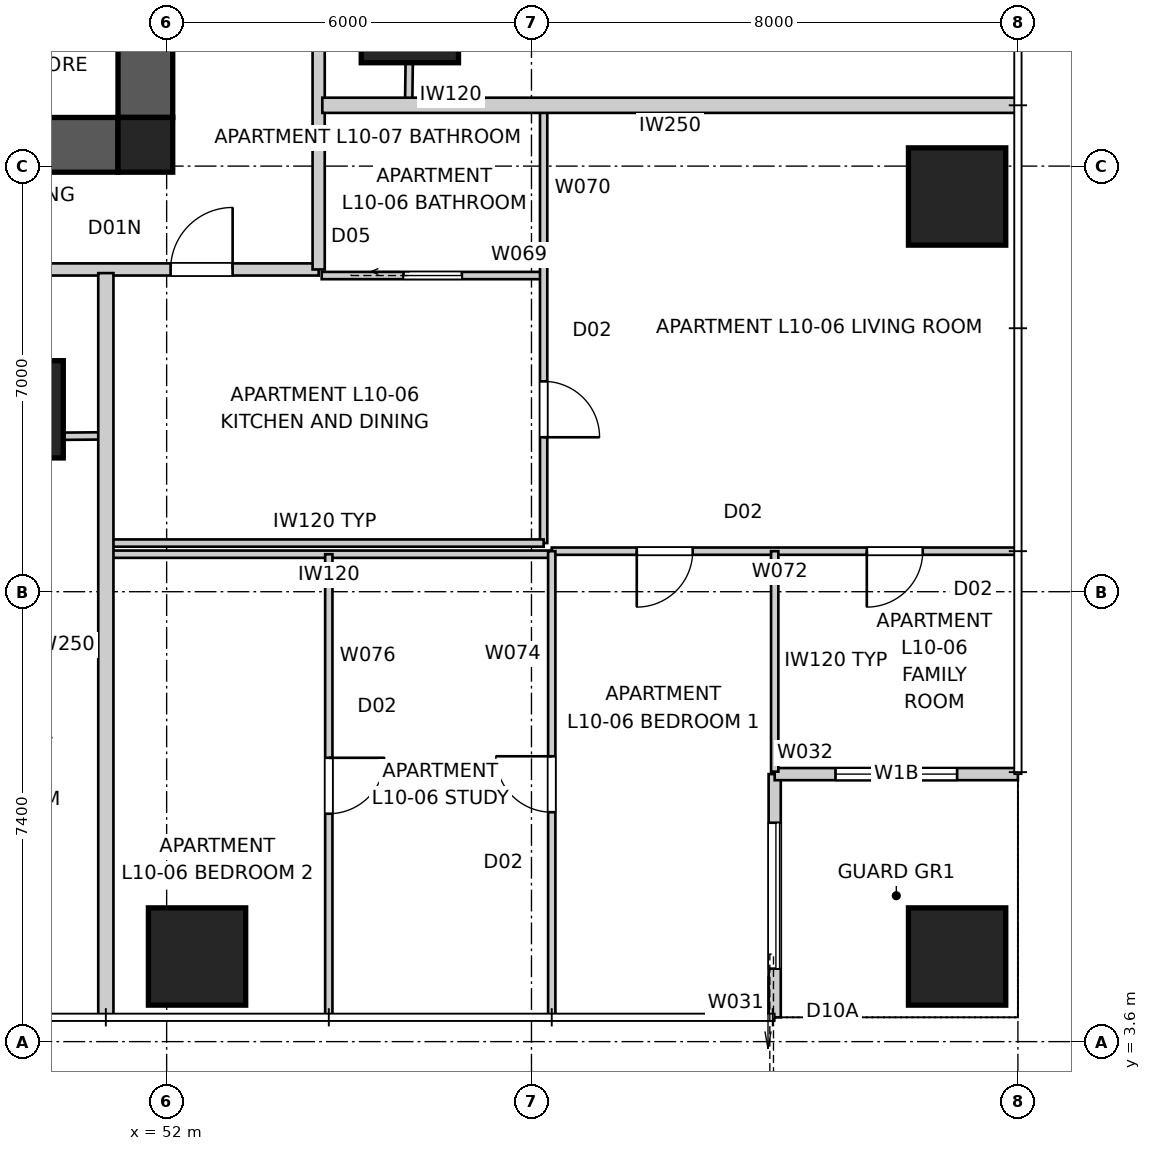
"""IFC4 building model, lengths in metres.
Left out: names, types, materials, properties, quantities, classifications, styles, units other than length and angle.
Written with IfcOpenShell. Run it as: python <this file> out.ifc"""

import sys

from ifc_helpers import new_model, si_unit, direction, frame, frame_2d, origin, origin_2d, place, context, subcontext, project, spatial, polyline, rectangle, outline, extrude, element, fill, save


model = new_model("IFC4")
c1 = context("Model", 3, precision=1e-05, world=origin(), true_north=direction((0.0, 1.0)))
c2 = subcontext(c1, "Body", "Model", "MODEL_VIEW")
j1 = project(units=[si_unit("LENGTHUNIT", "METRE"), si_unit("PLANEANGLEUNIT", "RADIAN")], contexts=[c1])
p1 = place(None, origin())
s1 = spatial("IfcSite", under=j1, at=p1, CompositionType="ELEMENT")
p2 = place(p1, origin())
s2 = spatial("IfcBuilding", under=s1, at=p2, CompositionType="ELEMENT")
p3 = place(p2, frame((0.0, 0.0, 38.8)))
s3 = spatial("IfcBuildingStorey", under=s2, at=p3, CompositionType="ELEMENT", Elevation=38.8)
p4 = place(p3, frame((51.2, 18.35, 0.0), z_axis=(0.0, 0.0, 1.0), x_axis=(-1.0, 0.0, 0.0)))
e1 = element("IfcWall", 1, at=p4, inside=s3, PredefinedType="SHEAR", context=c2, shape_type="SweptSolid", body=[
    extrude(outline(polyline([(0.0, -0.45), (22.4, -0.45), (22.4, -0.025), (22.85, -0.025), (22.85, 0.025), (22.4, 0.025), (22.4, 0.45), (0.0, 0.45), (0.0, 0.025), (-0.45, 0.025), (-0.45, -0.025), (0.0, -0.025), (0.0, -0.45)])), origin(), (0.0, 0.0, 1.0), 3.4),
])
p5 = place(p3, frame((51.65, 18.8, 0.0), z_axis=(0.0, 0.0, 1.0), x_axis=(0.0, 1.0, 0.0)))
e2 = element("IfcWall", 2, at=p5, inside=s3, PredefinedType="SHEAR", context=c2, shape_type="SweptSolid", body=[
    extrude(outline(polyline([(0.0, -0.45), (22.4, -0.45), (22.4, -0.025), (22.85, -0.025), (22.85, 0.025), (22.4, 0.025), (22.4, 0.45), (0.0, 0.45), (0.0, 0.025), (-0.45, 0.025), (-0.45, -0.025), (0.0, -0.025), (0.0, -0.45)])), origin(), (0.0, 0.0, 1.0), 3.4),
])
p6 = place(p5, frame((11.14, 0.0, 0.0)))
e3 = element("IfcOpeningElement", 3, at=p6, cuts=e2, PredefinedType="OPENING", context=c2, shape_type="SweptSolid", body=[
    extrude(rectangle(XDim=1.02, YDim=2.4, at=frame_2d((0.51, 1.2))), frame((0.0, 0.46, 0.0), z_axis=(0.0, -1.0, 0.0), x_axis=(1.0, 0.0, 0.0)), (0.0, 0.0, 1.0), 0.92),
])
p7 = place(p3, frame((51.65, 18.35, 0.0), z_axis=(0.0, 0.0, 1.0), x_axis=(1.0, 0.0, 0.0)))
e4 = element("IfcColumn", 4, at=p7, inside=s3, PredefinedType="COLUMN", context=c2, shape_type="SweptSolid", body=[
    extrude(rectangle(XDim=0.9, YDim=0.9, at=origin_2d()), origin(), (0.0, 0.0, 1.0), 3.4),
])
for number, where, z_axis, x_axis in (
    (5, (52.5, 5.0, 0.0), (0.0, 0.0, 1.0), (1.0, 0.0, 0.0)),
    (6, (65.0, 5.0, 0.0), (0.0, 0.0, 1.0), (1.0, 0.0, 0.0)),
    (7, (65.0, 17.5, 0.0), (0.0, 0.0, 1.0), (1.0, 0.0, 0.0)),
):
    element("IfcColumn", number, at=place(p3, frame(where, z_axis=z_axis, x_axis=x_axis)), inside=s3, PredefinedType="COLUMN", context=c2, shape_type="SweptSolid", body=[
        extrude(rectangle(XDim=1.6, YDim=1.6, at=origin_2d()), origin(), (0.0, 0.0, 1.0), 3.2),
    ])
for number, where, z_axis, x_axis in (
    (8, (49.5, 14.0, 0.0), (0.0, 0.0, 1.0), (1.0, 0.0, 0.0)),
    (9, (56.0, 20.5, 0.0), (0.0, 0.0, 1.0), (1.0, 0.0, 0.0)),
):
    element("IfcColumn", number, at=place(p3, frame(where, z_axis=z_axis, x_axis=x_axis)), inside=s3, PredefinedType="COLUMN", context=c2, shape_type="SweptSolid", body=[
        extrude(rectangle(XDim=1.6, YDim=1.6, at=origin_2d()), origin(), (0.0, 0.0, 1.0), 3.4),
    ])
p8 = place(p3, frame((62.0, 4.0, 0.0), z_axis=(0.0, 0.0, 1.0), x_axis=(0.0, 1.0, 0.0)))
e10 = element("IfcWall", 10, at=p8, inside=s3, PredefinedType="SOLIDWALL", context=c2, shape_type="SweptSolid", body=[
    extrude(rectangle(XDim=4.0, YDim=0.2, at=frame_2d((2.0, 0.0))), origin(), (0.0, 0.0, 1.0), 3.2),
])
p9 = place(p8, frame((0.8, 0.0, 0.0)))
e11 = element("IfcOpeningElement", 11, at=p9, cuts=e10, PredefinedType="OPENING", context=c2, shape_type="SweptSolid", body=[
    extrude(rectangle(XDim=2.4, YDim=2.1, at=frame_2d((1.2, 1.05))), frame((0.0, 0.11, 0.0), z_axis=(0.0, -1.0, 0.0), x_axis=(1.0, 0.0, 0.0)), (0.0, 0.0, 1.0), 0.22),
])
p10 = place(p3, frame((62.0, 8.0, 0.0), z_axis=(0.0, 0.0, 1.0), x_axis=(1.0, 0.0, 0.0)))
e12 = element("IfcWall", 12, at=p10, inside=s3, PredefinedType="SOLIDWALL", context=c2, shape_type="SweptSolid", body=[
    extrude(rectangle(XDim=4.0, YDim=0.2, at=frame_2d((2.0, 0.0))), origin(), (0.0, 0.0, 1.0), 3.2),
])
p11 = place(p10, frame((1.0, 0.0, 0.4)))
e13 = element("IfcOpeningElement", 13, at=p11, cuts=e12, PredefinedType="OPENING", context=c2, shape_type="SweptSolid", body=[
    extrude(rectangle(XDim=2.0, YDim=1.8, at=frame_2d((1.0, 0.9))), frame((0.0, 0.11, 0.0), z_axis=(0.0, -1.0, 0.0), x_axis=(1.0, 0.0, 0.0)), (0.0, 0.0, 1.0), 0.22),
])
p12 = place(p3, frame((26.3, 16.3, 0.0), z_axis=(0.0, 0.0, 1.0), x_axis=(1.0, 0.0, 0.0)))
e14 = element("IfcWall", 14, at=p12, inside=s3, PredefinedType="PARTITIONING", context=c2, shape_type="SweptSolid", body=[
    extrude(rectangle(XDim=28.2, YDim=0.2, at=frame_2d((14.1, 0.0))), origin(), (0.0, 0.0, 1.0), 3.2),
])
p13 = place(p12, frame((4.738, 0.0, 0.0)))
e15 = element("IfcOpeningElement", 15, at=p13, cuts=e14, PredefinedType="OPENING", context=c2, shape_type="SweptSolid", body=[
    extrude(rectangle(XDim=1.02, YDim=2.34, at=frame_2d((0.51, 1.17))), frame((0.0, 0.11, 0.0), z_axis=(0.0, -1.0, 0.0), x_axis=(1.0, 0.0, 0.0)), (0.0, 0.0, 1.0), 0.22),
])
p14 = place(p12, frame((14.525, 0.0, 0.0)))
e16 = element("IfcOpeningElement", 16, at=p14, cuts=e14, PredefinedType="OPENING", context=c2, shape_type="SweptSolid", body=[
    extrude(rectangle(XDim=1.02, YDim=2.34, at=frame_2d((0.51, 1.17))), frame((0.0, 0.11, 0.0), z_axis=(0.0, -1.0, 0.0), x_axis=(1.0, 0.0, 0.0)), (0.0, 0.0, 1.0), 0.22),
])
p15 = place(p12, frame((22.333, 0.0, 0.0)))
e17 = element("IfcOpeningElement", 17, at=p15, cuts=e14, PredefinedType="OPENING", context=c2, shape_type="SweptSolid", body=[
    extrude(rectangle(XDim=1.02, YDim=2.34, at=frame_2d((0.51, 1.17))), frame((0.0, 0.11, 0.0), z_axis=(0.0, -1.0, 0.0), x_axis=(1.0, 0.0, 0.0)), (0.0, 0.0, 1.0), 0.22),
])
p16 = place(p12, frame((25.765, 0.0, 0.0)))
e18 = element("IfcOpeningElement", 18, at=p16, cuts=e14, PredefinedType="OPENING", context=c2, shape_type="SweptSolid", body=[
    extrude(rectangle(XDim=1.02, YDim=2.0, at=frame_2d((0.51, 1.0))), frame((0.0, 0.11, 0.0), z_axis=(0.0, -1.0, 0.0), x_axis=(1.0, 0.0, 0.0)), (0.0, 0.0, 1.0), 0.22),
])
p17 = place(p12, frame((1.015, 0.0, 0.0)))
e19 = element("IfcOpeningElement", 19, at=p17, cuts=e14, PredefinedType="OPENING", context=c2, shape_type="SweptSolid", body=[
    extrude(rectangle(XDim=1.02, YDim=2.0, at=frame_2d((0.51, 1.0))), frame((0.0, 0.11, 0.0), z_axis=(0.0, -1.0, 0.0), x_axis=(1.0, 0.0, 0.0)), (0.0, 0.0, 1.0), 0.22),
])
p18 = place(p3, frame((54.5, 16.3, 0.0), z_axis=(0.0, 0.0, 1.0), x_axis=(0.0, 1.0, 0.0)))
e20 = element("IfcWall", 20, at=p18, inside=s3, PredefinedType="PARTITIONING", context=c2, shape_type="SweptSolid", body=[
    extrude(rectangle(XDim=28.2, YDim=0.2, at=frame_2d((14.1, 0.0))), origin(), (0.0, 0.0, 1.0), 3.2),
])
p19 = place(p18, frame((7.277, 0.0, 0.0)))
e21 = element("IfcOpeningElement", 21, at=p19, cuts=e20, PredefinedType="OPENING", context=c2, shape_type="SweptSolid", body=[
    extrude(rectangle(XDim=1.02, YDim=2.34, at=frame_2d((0.51, 1.17))), frame((0.0, 0.11, 0.0), z_axis=(0.0, -1.0, 0.0), x_axis=(1.0, 0.0, 0.0)), (0.0, 0.0, 1.0), 0.22),
])
p20 = place(p18, frame((15.16, 0.0, 0.0)))
e22 = element("IfcOpeningElement", 22, at=p20, cuts=e20, PredefinedType="OPENING", context=c2, shape_type="SweptSolid", body=[
    extrude(rectangle(XDim=1.02, YDim=2.34, at=frame_2d((0.51, 1.17))), frame((0.0, 0.11, 0.0), z_axis=(0.0, -1.0, 0.0), x_axis=(1.0, 0.0, 0.0)), (0.0, 0.0, 1.0), 0.22),
])
p21 = place(p3, frame((51.0, 4.0, 0.0), z_axis=(0.0, 0.0, 1.0), x_axis=(0.0, 1.0, 0.0)))
e23 = element("IfcWall", 23, at=p21, inside=s3, PredefinedType="PARTITIONING", context=c2, shape_type="SweptSolid", body=[
    extrude(rectangle(XDim=12.24, YDim=0.25, at=frame_2d((6.12, 0.0))), origin(), (0.0, 0.0, 1.0), 3.2),
])
p22 = place(p3, frame((66.0, 19.0, 0.0), z_axis=(0.0, 0.0, 1.0), x_axis=(-1.0, 0.0, 0.0)))
e24 = element("IfcWall", 24, at=p22, inside=s3, PredefinedType="PARTITIONING", context=c2, shape_type="SweptSolid", body=[
    extrude(rectangle(XDim=11.44, YDim=0.25, at=frame_2d((5.72, 0.0))), origin(), (0.0, 0.0, 1.0), 3.2),
])
p23 = place(p3, frame((51.0, 13.563, 0.0), z_axis=(0.0, 0.0, 1.0), x_axis=(-0.9999611125, -0.008818927805, 0.0)))
e25 = element("IfcWall", 25, at=p23, inside=s3, PredefinedType="PARTITIONING", context=c2, shape_type="SweptSolid", body=[
    extrude(rectangle(XDim=3.71, YDim=0.12, at=frame_2d((1.855, 0.0))), origin(), (0.0, 0.0, 1.0), 2.2),
])
p24 = place(p23, frame((2.445, 0.0, 0.0)))
e26 = element("IfcOpeningElement", 26, at=p24, cuts=e25, PredefinedType="OPENING", context=c2, shape_type="SweptSolid", body=[
    extrude(rectangle(XDim=0.92, YDim=2.1, at=frame_2d((0.46, 1.05))), frame((0.0, 0.07, 0.0), z_axis=(0.0, -1.0, 0.0), x_axis=(1.0, 0.0, 0.0)), (0.0, 0.0, 1.0), 0.14),
])
p25 = place(p3, frame((54.55, 16.2, 0.0), z_axis=(0.0, 0.0, 1.0), x_axis=(1.0, 0.0, 0.0)))
e27 = element("IfcWall", 27, at=p25, inside=s3, PredefinedType="PARTITIONING", context=c2, shape_type="SweptSolid", body=[
    extrude(rectangle(XDim=3.65, YDim=0.12, at=frame_2d((1.825, 0.0))), origin(), (0.0, 0.0, 1.0), 3.2),
])
p26 = place(p25, frame((1.345, 0.0, 0.0)))
e28 = element("IfcOpeningElement", 28, at=p26, cuts=e27, PredefinedType="OPENING", context=c2, shape_type="SweptSolid", body=[
    extrude(rectangle(XDim=0.96, YDim=2.1, at=frame_2d((0.48, 1.05))), frame((0.0, 0.07, 0.0), z_axis=(0.0, -1.0, 0.0), x_axis=(1.0, 0.0, 0.0)), (0.0, 0.0, 1.0), 0.14),
])
p27 = place(p3, frame((58.2, 19.0, 0.0), z_axis=(0.0, 0.0, 1.0), x_axis=(0.0, -1.0, 0.0)))
e29 = element("IfcWall", 29, at=p27, inside=s3, PredefinedType="PARTITIONING", context=c2, shape_type="SweptSolid", body=[
    extrude(rectangle(XDim=7.2, YDim=0.12, at=frame_2d((3.6, 0.0))), origin(), (0.0, 0.0, 1.0), 3.2),
])
p28 = place(p27, frame((4.54, 0.0, 0.0)))
e30 = element("IfcOpeningElement", 30, at=p28, cuts=e29, PredefinedType="OPENING", context=c2, shape_type="SweptSolid", body=[
    extrude(rectangle(XDim=0.92, YDim=2.34, at=frame_2d((0.46, 1.17))), frame((0.0, 0.07, 0.0), z_axis=(0.0, -1.0, 0.0), x_axis=(1.0, 0.0, 0.0)), (0.0, 0.0, 1.0), 0.14),
])
p29 = place(p3, frame((58.2, 11.8, 0.0), z_axis=(0.0, 0.0, 1.0), x_axis=(-1.0, 0.0, 0.0)))
e31 = element("IfcWall", 31, at=p29, inside=s3, PredefinedType="PARTITIONING", context=c2, shape_type="SweptSolid", body=[
    extrude(rectangle(XDim=7.2, YDim=0.12, at=frame_2d((3.6, 0.0))), origin(), (0.0, 0.0, 1.0), 3.2),
])
p30 = place(p3, frame((65.96, 11.667, 0.0), z_axis=(0.0, 0.0, 1.0), x_axis=(-1.0, 0.0, 0.0)))
e32 = element("IfcWall", 32, at=p30, inside=s3, PredefinedType="PARTITIONING", context=c2, shape_type="SweptSolid", body=[
    extrude(rectangle(XDim=7.627, YDim=0.12, at=frame_2d((3.813, 0.0))), origin(), (0.0, 0.0, 1.0), 3.2),
])
p31 = place(p30, frame((1.525, 0.0, 0.0)))
e33 = element("IfcOpeningElement", 33, at=p31, cuts=e32, PredefinedType="OPENING", context=c2, shape_type="SweptSolid", body=[
    extrude(rectangle(XDim=0.92, YDim=2.34, at=frame_2d((0.46, 1.17))), frame((0.0, 0.07, 0.0), z_axis=(0.0, -1.0, 0.0), x_axis=(1.0, 0.0, 0.0)), (0.0, 0.0, 1.0), 0.14),
])
p32 = place(p30, frame((5.308, 0.0, 0.0)))
e34 = element("IfcOpeningElement", 34, at=p32, cuts=e32, PredefinedType="OPENING", context=c2, shape_type="SweptSolid", body=[
    extrude(rectangle(XDim=0.92, YDim=2.34, at=frame_2d((0.46, 1.17))), frame((0.0, 0.07, 0.0), z_axis=(0.0, -1.0, 0.0), x_axis=(1.0, 0.0, 0.0)), (0.0, 0.0, 1.0), 0.14),
])
p33 = place(p3, frame((58.333, 11.617, 0.0), z_axis=(0.0, 0.0, 1.0), x_axis=(-1.0, 0.0, 0.0)))
e35 = element("IfcWall", 35, at=p33, inside=s3, PredefinedType="PARTITIONING", context=c2, shape_type="SweptSolid", body=[
    extrude(rectangle(XDim=7.333, YDim=0.12, at=frame_2d((3.667, 0.0))), origin(), (0.0, 0.0, 1.0), 3.2),
])
p34 = place(p3, frame((58.333, 4.04, 0.0), z_axis=(0.0, 0.0, 1.0), x_axis=(0.0, 1.0, 0.0)))
e36 = element("IfcWall", 36, at=p34, inside=s3, PredefinedType="PARTITIONING", context=c2, shape_type="SweptSolid", body=[
    extrude(rectangle(XDim=7.627, YDim=0.12, at=frame_2d((3.813, 0.0))), origin(), (0.0, 0.0, 1.0), 3.2),
])
p35 = place(p34, frame((3.333, 0.0, 0.0)))
e37 = element("IfcOpeningElement", 37, at=p35, cuts=e36, PredefinedType="OPENING", context=c2, shape_type="SweptSolid", body=[
    extrude(rectangle(XDim=0.92, YDim=2.34, at=frame_2d((0.46, 1.17))), frame((0.0, 0.07, 0.0), z_axis=(0.0, -1.0, 0.0), x_axis=(1.0, 0.0, 0.0)), (0.0, 0.0, 1.0), 0.14),
])
p36 = place(p3, frame((62.0, 11.667, 0.0), z_axis=(0.0, 0.0, 1.0), x_axis=(0.0, -1.0, 0.0)))
e38 = element("IfcWall", 38, at=p36, inside=s3, PredefinedType="PARTITIONING", context=c2, shape_type="SweptSolid", body=[
    extrude(rectangle(XDim=3.627, YDim=0.12, at=frame_2d((1.813, 0.0))), origin(), (0.0, 0.0, 1.0), 3.2),
])
p37 = place(p3, frame((54.667, 11.617, 0.0), z_axis=(0.0, 0.0, 1.0), x_axis=(0.0, -1.0, 0.0)))
e39 = element("IfcWall", 39, at=p37, inside=s3, PredefinedType="PARTITIONING", context=c2, shape_type="SweptSolid", body=[
    extrude(rectangle(XDim=7.577, YDim=0.12, at=frame_2d((3.788, 0.0))), origin(), (0.0, 0.0, 1.0), 2.4),
])
p38 = place(p37, frame((3.348, 0.0, 0.0)))
e40 = element("IfcOpeningElement", 40, at=p38, cuts=e39, PredefinedType="OPENING", context=c2, shape_type="SweptSolid", body=[
    extrude(rectangle(XDim=0.92, YDim=2.34, at=frame_2d((0.46, 1.17))), frame((0.0, 0.07, 0.0), z_axis=(0.0, -1.0, 0.0), x_axis=(1.0, 0.0, 0.0)), (0.0, 0.0, 1.0), 0.14),
])
p39 = place(p3, frame((56.029, 22.667, 0.0), z_axis=(0.0, 0.0, 1.0), x_axis=(-0.013448414164, -0.999909565989, 0.0)))
e41 = element("IfcWall", 41, at=p39, inside=s3, PredefinedType="PARTITIONING", context=c2, shape_type="SweptSolid", body=[
    extrude(rectangle(XDim=3.667, YDim=0.12, at=frame_2d((1.833, 0.0))), origin(), (0.0, 0.0, 1.0), 2.2),
])
p40 = place(p9, origin())
e42 = element("IfcDoor", 42, at=p40, inside=s3, OperationType="SLIDING_TO_LEFT", PredefinedType="DOOR", context=c2, shape_type="SweptSolid", body=[
    extrude(rectangle(XDim=2.4, YDim=2.1, at=frame_2d((1.2, 1.05))), frame((0.0, 0.025, 0.0), z_axis=(0.0, -1.0, 0.0), x_axis=(1.0, 0.0, 0.0)), (0.0, 0.0, 1.0), 0.05),
])
fill(e11, e42)
p41 = place(p11, origin())
e43 = element("IfcWindow", 43, at=p41, inside=s3, PartitioningType="SINGLE_PANEL", PredefinedType="WINDOW", context=c2, shape_type="SweptSolid", body=[
    extrude(rectangle(XDim=2.0, YDim=1.8, at=frame_2d((1.0, 0.9))), frame((0.0, 0.03, 0.0), z_axis=(0.0, -1.0, 0.0), x_axis=(1.0, 0.0, 0.0)), (0.0, 0.0, 1.0), 0.06),
])
fill(e13, e43)
p42 = place(p16, origin())
e44 = element("IfcDoor", 44, at=p42, inside=s3, OperationType="SINGLE_SWING_RIGHT", PredefinedType="DOOR", context=c2, shape_type="SweptSolid", body=[
    extrude(rectangle(XDim=1.02, YDim=2.0, at=frame_2d((0.51, 1.0))), frame((0.0, 0.025, 0.0), z_axis=(0.0, -1.0, 0.0), x_axis=(1.0, 0.0, 0.0)), (0.0, 0.0, 1.0), 0.05),
])
fill(e18, e44)
p43 = place(p28, origin())
e45 = element("IfcDoor", 45, at=p43, inside=s3, OperationType="SINGLE_SWING_RIGHT", PredefinedType="DOOR", context=c2, shape_type="SweptSolid", body=[
    extrude(rectangle(XDim=0.92, YDim=2.34, at=frame_2d((0.46, 1.17))), frame((0.0, 0.025, 0.0), z_axis=(0.0, -1.0, 0.0), x_axis=(1.0, 0.0, 0.0)), (0.0, 0.0, 1.0), 0.05),
])
fill(e30, e45)
p44 = place(p26, origin())
e46 = element("IfcDoor", 46, at=p44, inside=s3, OperationType="SLIDING_TO_LEFT", PredefinedType="DOOR", context=c2, shape_type="SweptSolid", body=[
    extrude(rectangle(XDim=0.96, YDim=2.1, at=frame_2d((0.48, 1.05))), frame((0.0, 0.025, 0.0), z_axis=(0.0, -1.0, 0.0), x_axis=(1.0, 0.0, 0.0)), (0.0, 0.0, 1.0), 0.05),
])
fill(e28, e46)
p45 = place(p31, origin())
e47 = element("IfcDoor", 47, at=p45, inside=s3, OperationType="SINGLE_SWING_RIGHT", PredefinedType="DOOR", context=c2, shape_type="SweptSolid", body=[
    extrude(rectangle(XDim=0.92, YDim=2.34, at=frame_2d((0.46, 1.17))), frame((0.0, 0.025, 0.0), z_axis=(0.0, -1.0, 0.0), x_axis=(1.0, 0.0, 0.0)), (0.0, 0.0, 1.0), 0.05),
])
fill(e33, e47)
p46 = place(p32, origin())
e48 = element("IfcDoor", 48, at=p46, inside=s3, OperationType="SINGLE_SWING_RIGHT", PredefinedType="DOOR", context=c2, shape_type="SweptSolid", body=[
    extrude(rectangle(XDim=0.92, YDim=2.34, at=frame_2d((0.46, 1.17))), frame((0.0, 0.025, 0.0), z_axis=(0.0, -1.0, 0.0), x_axis=(1.0, 0.0, 0.0)), (0.0, 0.0, 1.0), 0.05),
])
fill(e34, e48)
p47 = place(p35, origin())
e49 = element("IfcDoor", 49, at=p47, inside=s3, OperationType="SINGLE_SWING_RIGHT", PredefinedType="DOOR", context=c2, shape_type="SweptSolid", body=[
    extrude(rectangle(XDim=0.92, YDim=2.34, at=frame_2d((0.46, 1.17))), frame((0.0, 0.025, 0.0), z_axis=(0.0, -1.0, 0.0), x_axis=(1.0, 0.0, 0.0)), (0.0, 0.0, 1.0), 0.05),
])
fill(e37, e49)
p48 = place(p38, origin())
e50 = element("IfcDoor", 50, at=p48, inside=s3, OperationType="SINGLE_SWING_LEFT", PredefinedType="DOOR", context=c2, shape_type="SweptSolid", body=[
    extrude(rectangle(XDim=0.92, YDim=2.34, at=frame_2d((0.46, 1.17))), frame((0.0, 0.025, 0.0), z_axis=(0.0, -1.0, 0.0), x_axis=(1.0, 0.0, 0.0)), (0.0, 0.0, 1.0), 0.05),
])
fill(e40, e50)
save(model, sys.argv[1])
